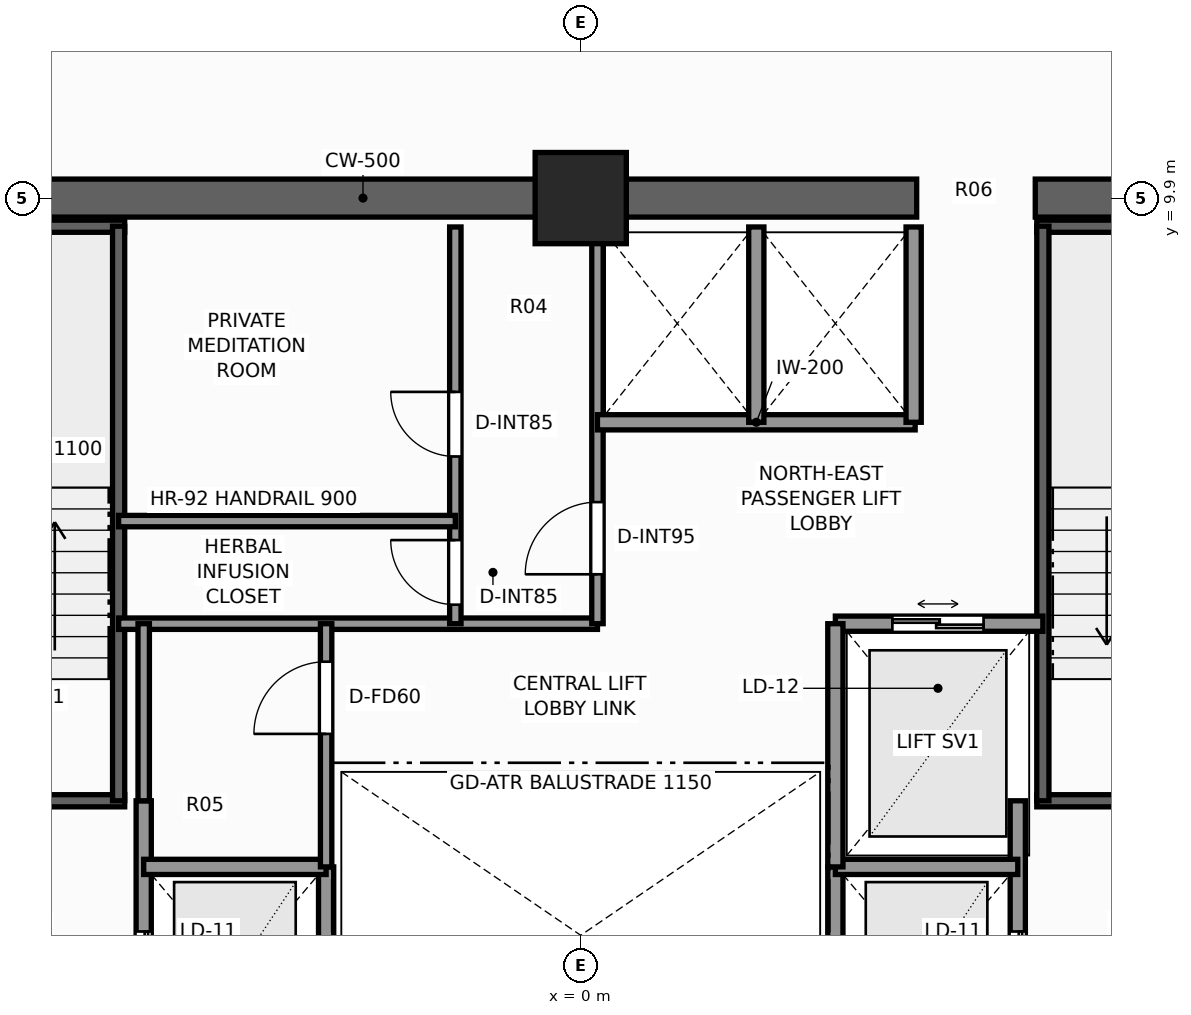
"""IFC4 building model, lengths in metres.
Left out: names, types, materials, properties, quantities, classifications, styles, units other than length and angle.
Written with IfcOpenShell. Run it as: python <this file> out.ifc"""

import sys

from ifc_helpers import new_model, si_unit, direction, frame, frame_2d, origin, origin_2d, place, context, subcontext, project, spatial, rectangle, extrude, element, fill, save


model = new_model("IFC4")
c1 = context("Model", 3, precision=1e-05, world=origin(), true_north=direction((0.0, 1.0)))
c2 = subcontext(c1, "Body", "Model", "MODEL_VIEW")
j1 = project(units=[si_unit("LENGTHUNIT", "METRE"), si_unit("PLANEANGLEUNIT", "RADIAN")], contexts=[c1])
p1 = place(None, origin())
s1 = spatial("IfcSite", under=j1, at=p1, CompositionType="ELEMENT")
p2 = place(p1, origin())
s2 = spatial("IfcBuilding", under=s1, at=p2, CompositionType="ELEMENT")
p3 = place(p2, frame((0.0, 0.0, 183.3)))
s3 = spatial("IfcBuildingStorey", under=s2, at=p3, CompositionType="ELEMENT", Elevation=183.3)
p4 = place(p3, frame((-10.15, 9.9, 0.0), z_axis=(0.0, 0.0, 1.0), x_axis=(1.0, 0.0, 0.0)))
e1 = element("IfcWall", 1, at=p4, inside=s3, PredefinedType="SHEAR", context=c2, shape_type="SweptSolid", body=[
    extrude(rectangle(XDim=14.57, YDim=0.5, at=frame_2d((7.285, 0.0))), origin(), (0.0, 0.0, 1.0), 3.3),
])
p5 = place(p3, frame((5.98, 9.9, 0.0), z_axis=(0.0, 0.0, 1.0), x_axis=(1.0, 0.0, 0.0)))
e2 = element("IfcWall", 2, at=p5, inside=s3, PredefinedType="SHEAR", context=c2, shape_type="SweptSolid", body=[
    extrude(rectangle(XDim=4.17, YDim=0.5, at=frame_2d((2.085, 0.0))), origin(), (0.0, 0.0, 1.0), 3.3),
])
p6 = place(p3, frame((0.0, 9.9, 0.0), z_axis=(0.0, 0.0, 1.0), x_axis=(1.0, 0.0, 0.0)))
e3 = element("IfcColumn", 3, at=p6, inside=s3, PredefinedType="COLUMN", context=c2, shape_type="SweptSolid", body=[
    extrude(rectangle(XDim=1.2, YDim=1.2, at=origin_2d()), origin(), (0.0, 0.0, 1.0), 3.3),
])
p7 = place(p3, frame((-9.52, 1.97, 0.0), z_axis=(0.0, 0.0, 1.0), x_axis=(1.0, 0.0, 0.0)))
e4 = element("IfcWall", 4, at=p7, inside=s3, PredefinedType="SHEAR", context=c2, shape_type="SweptSolid", body=[
    extrude(rectangle(XDim=3.52, YDim=0.16, at=frame_2d((1.76, 0.0))), origin(), (0.0, 0.0, 1.0), 3.3),
])
p8 = place(p7, frame((1.15, 0.0, 0.0)))
e5 = element("IfcOpeningElement", 5, at=p8, cuts=e4, PredefinedType="OPENING", context=c2, shape_type="SweptSolid", body=[
    extrude(rectangle(XDim=1.1, YDim=2.2, at=frame_2d((0.55, 1.1))), frame((0.0, 0.09, 0.0), z_axis=(0.0, -1.0, 0.0), x_axis=(1.0, 0.0, 0.0)), (0.0, 0.0, 1.0), 0.18),
])
p9 = place(p3, frame((-9.52, 9.53, 0.0), z_axis=(0.0, 0.0, 1.0), x_axis=(1.0, 0.0, 0.0)))
e6 = element("IfcWall", 6, at=p9, inside=s3, PredefinedType="SHEAR", context=c2, shape_type="SweptSolid", body=[
    extrude(rectangle(XDim=3.52, YDim=0.16, at=frame_2d((1.76, 0.0))), origin(), (0.0, 0.0, 1.0), 3.3),
])
p10 = place(p3, frame((-6.08, 1.97, 0.0), z_axis=(0.0, 0.0, 1.0), x_axis=(0.0, 1.0, 0.0)))
e7 = element("IfcWall", 7, at=p10, inside=s3, PredefinedType="SHEAR", context=c2, shape_type="SweptSolid", body=[
    extrude(rectangle(XDim=7.56, YDim=0.16, at=frame_2d((3.78, 0.0))), origin(), (0.0, 0.0, 1.0), 3.3),
])
p11 = place(p3, frame((6.0, 1.97, 0.0), z_axis=(0.0, 0.0, 1.0), x_axis=(1.0, 0.0, 0.0)))
e8 = element("IfcWall", 8, at=p11, inside=s3, PredefinedType="SHEAR", context=c2, shape_type="SweptSolid", body=[
    extrude(rectangle(XDim=3.52, YDim=0.16, at=frame_2d((1.76, 0.0))), origin(), (0.0, 0.0, 1.0), 3.3),
])
p12 = place(p11, frame((1.15, 0.0, 0.0)))
e9 = element("IfcOpeningElement", 9, at=p12, cuts=e8, PredefinedType="OPENING", context=c2, shape_type="SweptSolid", body=[
    extrude(rectangle(XDim=1.1, YDim=2.2, at=frame_2d((0.55, 1.1))), frame((0.0, 0.09, 0.0), z_axis=(0.0, -1.0, 0.0), x_axis=(1.0, 0.0, 0.0)), (0.0, 0.0, 1.0), 0.18),
])
p13 = place(p3, frame((6.0, 9.53, 0.0), z_axis=(0.0, 0.0, 1.0), x_axis=(1.0, 0.0, 0.0)))
e10 = element("IfcWall", 10, at=p13, inside=s3, PredefinedType="SHEAR", context=c2, shape_type="SweptSolid", body=[
    extrude(rectangle(XDim=3.52, YDim=0.16, at=frame_2d((1.76, 0.0))), origin(), (0.0, 0.0, 1.0), 3.3),
])
p14 = place(p3, frame((6.08, 1.97, 0.0), z_axis=(0.0, 0.0, 1.0), x_axis=(0.0, 1.0, 0.0)))
e11 = element("IfcWall", 11, at=p14, inside=s3, PredefinedType="SHEAR", context=c2, shape_type="SweptSolid", body=[
    extrude(rectangle(XDim=7.56, YDim=0.16, at=frame_2d((3.78, 0.0))), origin(), (0.0, 0.0, 1.0), 3.3),
])
p15 = place(p3, frame((-5.75, -3.6, 0.0), z_axis=(0.0, 0.0, 1.0), x_axis=(0.0, 1.0, 0.0)))
e12 = element("IfcWall", 12, at=p15, inside=s3, PredefinedType="SOLIDWALL", context=c2, shape_type="SweptSolid", body=[
    extrude(rectangle(XDim=5.57, YDim=0.2, at=frame_2d((2.785, 0.0))), origin(), (0.0, 0.0, 1.0), 2.715),
])
p16 = place(p15, frame((2.75, 0.0, 0.0)))
e13 = element("IfcOpeningElement", 13, at=p16, cuts=e12, PredefinedType="OPENING", context=c2, shape_type="SweptSolid", body=[
    extrude(rectangle(XDim=1.1, YDim=2.2, at=frame_2d((0.55, 1.1))), frame((0.0, 0.11, 0.0), z_axis=(0.0, -1.0, 0.0), x_axis=(1.0, 0.0, 0.0)), (0.0, 0.0, 1.0), 0.22),
])
p17 = place(p3, frame((-3.35, -1.7, 0.0), z_axis=(0.0, 0.0, 1.0), x_axis=(0.0, 1.0, 0.0)))
e14 = element("IfcWall", 14, at=p17, inside=s3, PredefinedType="SOLIDWALL", context=c2, shape_type="SweptSolid", body=[
    extrude(rectangle(XDim=2.8, YDim=0.2, at=frame_2d((1.4, 0.0))), origin(), (0.0, 0.0, 1.0), 2.715),
])
p18 = place(p3, frame((-5.75, 1.1, 0.0), z_axis=(0.0, 0.0, 1.0), x_axis=(1.0, 0.0, 0.0)))
e15 = element("IfcWall", 15, at=p18, inside=s3, PredefinedType="SOLIDWALL", context=c2, shape_type="SweptSolid", body=[
    extrude(rectangle(XDim=2.4, YDim=0.2, at=frame_2d((1.2, 0.0))), origin(), (0.0, 0.0, 1.0), 3.08),
])
p19 = place(p3, frame((5.75, -3.6, 0.0), z_axis=(0.0, 0.0, 1.0), x_axis=(0.0, 1.0, 0.0)))
e16 = element("IfcWall", 16, at=p19, inside=s3, PredefinedType="SOLIDWALL", context=c2, shape_type="SweptSolid", body=[
    extrude(rectangle(XDim=5.57, YDim=0.2, at=frame_2d((2.785, 0.0))), origin(), (0.0, 0.0, 1.0), 2.715),
])
p20 = place(p19, frame((2.75, 0.0, 0.0)))
e17 = element("IfcOpeningElement", 17, at=p20, cuts=e16, PredefinedType="OPENING", context=c2, shape_type="SweptSolid", body=[
    extrude(rectangle(XDim=1.1, YDim=2.2, at=frame_2d((0.55, 1.1))), frame((0.0, 0.11, 0.0), z_axis=(0.0, -1.0, 0.0), x_axis=(1.0, 0.0, 0.0)), (0.0, 0.0, 1.0), 0.22),
])
p21 = place(p3, frame((3.35, -1.7, 0.0), z_axis=(0.0, 0.0, 1.0), x_axis=(0.0, 1.0, 0.0)))
e18 = element("IfcWall", 18, at=p21, inside=s3, PredefinedType="SOLIDWALL", context=c2, shape_type="SweptSolid", body=[
    extrude(rectangle(XDim=2.8, YDim=0.2, at=frame_2d((1.4, 0.0))), origin(), (0.0, 0.0, 1.0), 2.715),
])
p22 = place(p3, frame((3.35, 1.1, 0.0), z_axis=(0.0, 0.0, 1.0), x_axis=(1.0, 0.0, 0.0)))
e19 = element("IfcWall", 19, at=p22, inside=s3, PredefinedType="SOLIDWALL", context=c2, shape_type="SweptSolid", body=[
    extrude(rectangle(XDim=2.4, YDim=0.2, at=frame_2d((1.2, 0.0))), origin(), (0.0, 0.0, 1.0), 3.08),
])
p23 = place(p3, frame((3.35, 4.3, 0.0), z_axis=(0.0, 0.0, 1.0), x_axis=(1.0, 0.0, 0.0)))
e20 = element("IfcWall", 20, at=p23, inside=s3, PredefinedType="SOLIDWALL", context=c2, shape_type="SweptSolid", body=[
    extrude(rectangle(XDim=2.73, YDim=0.2, at=frame_2d((1.365, 0.0))), origin(), (0.0, 0.0, 1.0), 3.08),
])
p24 = place(p23, frame((0.75, 0.0, 0.0)))
e21 = element("IfcOpeningElement", 21, at=p24, cuts=e20, PredefinedType="OPENING", context=c2, shape_type="SweptSolid", body=[
    extrude(rectangle(XDim=1.2, YDim=2.25, at=frame_2d((0.6, 1.125))), frame((0.0, 0.11, 0.0), z_axis=(0.0, -1.0, 0.0), x_axis=(1.0, 0.0, 0.0)), (0.0, 0.0, 1.0), 0.22),
])
p25 = place(p3, frame((3.35, 1.1, 0.0), z_axis=(0.0, 0.0, 1.0), x_axis=(0.0, 1.0, 0.0)))
e22 = element("IfcWall", 22, at=p25, inside=s3, PredefinedType="SOLIDWALL", context=c2, shape_type="SweptSolid", body=[
    extrude(rectangle(XDim=3.2, YDim=0.2, at=frame_2d((1.6, 0.0))), origin(), (0.0, 0.0, 1.0), 2.715),
])
p26 = place(p3, frame((-6.08, 4.3, 0.0), z_axis=(0.0, 0.0, 1.0), x_axis=(1.0, 0.0, 0.0)))
e23 = element("IfcWall", 23, at=p26, inside=s3, PredefinedType="PARTITIONING", context=c2, shape_type="SweptSolid", body=[
    extrude(rectangle(XDim=6.3, YDim=0.15, at=frame_2d((3.15, 0.0))), origin(), (0.0, 0.0, 1.0), 3.08),
])
p27 = place(p3, frame((0.22, 4.3, 0.0), z_axis=(0.0, 0.0, 1.0), x_axis=(0.0, 1.0, 0.0)))
e24 = element("IfcWall", 24, at=p27, inside=s3, PredefinedType="PARTITIONING", context=c2, shape_type="SweptSolid", body=[
    extrude(rectangle(XDim=5.22, YDim=0.15, at=frame_2d((2.61, 0.0))), origin(), (0.0, 0.0, 1.0), 3.08),
])
p28 = place(p27, frame((0.65, 0.0, 0.0)))
e25 = element("IfcOpeningElement", 25, at=p28, cuts=e24, PredefinedType="OPENING", context=c2, shape_type="SweptSolid", body=[
    extrude(rectangle(XDim=0.95, YDim=2.06, at=frame_2d((0.475, 1.03))), frame((0.0, 0.085, 0.0), z_axis=(0.0, -1.0, 0.0), x_axis=(1.0, 0.0, 0.0)), (0.0, 0.0, 1.0), 0.17),
])
p29 = place(p3, frame((-1.65, 4.3, 0.0), z_axis=(0.0, 0.0, 1.0), x_axis=(0.0, 1.0, 0.0)))
e26 = element("IfcWall", 26, at=p29, inside=s3, PredefinedType="PARTITIONING", context=c2, shape_type="SweptSolid", body=[
    extrude(rectangle(XDim=5.22, YDim=0.15, at=frame_2d((2.61, 0.0))), origin(), (0.0, 0.0, 1.0), 3.08),
])
p30 = place(p29, frame((2.2, 0.0, 0.0)))
e27 = element("IfcOpeningElement", 27, at=p30, cuts=e26, PredefinedType="OPENING", context=c2, shape_type="SweptSolid", body=[
    extrude(rectangle(XDim=0.85, YDim=2.03, at=frame_2d((0.425, 1.015))), frame((0.0, 0.085, 0.0), z_axis=(0.0, -1.0, 0.0), x_axis=(1.0, 0.0, 0.0)), (0.0, 0.0, 1.0), 0.17),
])
p31 = place(p29, frame((0.25, 0.0, 0.0)))
e28 = element("IfcOpeningElement", 28, at=p31, cuts=e26, PredefinedType="OPENING", context=c2, shape_type="SweptSolid", body=[
    extrude(rectangle(XDim=0.85, YDim=2.03, at=frame_2d((0.425, 1.015))), frame((0.0, 0.085, 0.0), z_axis=(0.0, -1.0, 0.0), x_axis=(1.0, 0.0, 0.0)), (0.0, 0.0, 1.0), 0.17),
])
p32 = place(p3, frame((-6.08, 5.65, 0.0), z_axis=(0.0, 0.0, 1.0), x_axis=(1.0, 0.0, 0.0)))
e29 = element("IfcWall", 29, at=p32, inside=s3, PredefinedType="PARTITIONING", context=c2, shape_type="SweptSolid", body=[
    extrude(rectangle(XDim=4.43, YDim=0.15, at=frame_2d((2.215, 0.0))), origin(), (0.0, 0.0, 1.0), 3.08),
])
p33 = place(p3, frame((0.22, 6.95, 0.0), z_axis=(0.0, 0.0, 1.0), x_axis=(1.0, 0.0, 0.0)))
e30 = element("IfcWall", 30, at=p33, inside=s3, PredefinedType="SOLIDWALL", context=c2, shape_type="SweptSolid", body=[
    extrude(rectangle(XDim=4.18, YDim=0.2, at=frame_2d((2.09, 0.0))), origin(), (0.0, 0.0, 1.0), 3.08),
])
for number, where, z_axis, x_axis in (
    (31, (4.38, 6.95, 0.0), (0.0, 0.0, 1.0), (0.0, 1.0, 0.0)),
    (32, (2.31, 6.95, 0.0), (0.0, 0.0, 1.0), (0.0, 1.0, 0.0)),
):
    element("IfcWall", number, at=place(p3, frame(where, z_axis=z_axis, x_axis=x_axis)), inside=s3, PredefinedType="SOLIDWALL", context=c2, shape_type="SweptSolid", body=[
        extrude(rectangle(XDim=2.57, YDim=0.2, at=frame_2d((1.285, 0.0))), origin(), (0.0, 0.0, 1.0), 3.08),
    ])
p34 = place(p3, frame((-3.35, 1.1, 0.0), z_axis=(0.0, 0.0, 1.0), x_axis=(0.0, 1.0, 0.0)))
e33 = element("IfcWall", 33, at=p34, inside=s3, PredefinedType="PARTITIONING", context=c2, shape_type="SweptSolid", body=[
    extrude(rectangle(XDim=3.2, YDim=0.15, at=frame_2d((1.6, 0.0))), origin(), (0.0, 0.0, 1.0), 2.715),
])
p35 = place(p34, frame((1.75, 0.0, 0.0)))
e34 = element("IfcOpeningElement", 34, at=p35, cuts=e33, PredefinedType="OPENING", context=c2, shape_type="SweptSolid", body=[
    extrude(rectangle(XDim=0.95, YDim=2.06, at=frame_2d((0.475, 1.03))), frame((0.0, 0.085, 0.0), z_axis=(0.0, -1.0, 0.0), x_axis=(1.0, 0.0, 0.0)), (0.0, 0.0, 1.0), 0.17),
])
p36 = place(p3, frame((-5.75, 1.97, 0.0), z_axis=(0.0, 0.0, 1.0), x_axis=(0.0, 1.0, 0.0)))
e35 = element("IfcWall", 35, at=p36, inside=s3, PredefinedType="PARTITIONING", context=c2, shape_type="SweptSolid", body=[
    extrude(rectangle(XDim=2.33, YDim=0.15, at=frame_2d((1.165, 0.0))), origin(), (0.0, 0.0, 1.0), 2.715),
])
p37 = place(p16, origin())
e36 = element("IfcDoor", 36, at=p37, inside=s3, OperationType="DOUBLE_DOOR_SLIDING", PredefinedType="DOOR", context=c2, shape_type="SweptSolid", body=[
    extrude(rectangle(XDim=1.1, YDim=2.2, at=frame_2d((0.55, 1.1))), frame((0.0, 0.025, 0.0), z_axis=(0.0, -1.0, 0.0), x_axis=(1.0, 0.0, 0.0)), (0.0, 0.0, 1.0), 0.05),
])
fill(e13, e36)
p38 = place(p20, origin())
e37 = element("IfcDoor", 37, at=p38, inside=s3, OperationType="DOUBLE_DOOR_SLIDING", PredefinedType="DOOR", context=c2, shape_type="SweptSolid", body=[
    extrude(rectangle(XDim=1.1, YDim=2.2, at=frame_2d((0.55, 1.1))), frame((0.0, 0.025, 0.0), z_axis=(0.0, -1.0, 0.0), x_axis=(1.0, 0.0, 0.0)), (0.0, 0.0, 1.0), 0.05),
])
fill(e17, e37)
p39 = place(p24, origin())
e38 = element("IfcDoor", 38, at=p39, inside=s3, OperationType="DOUBLE_DOOR_SLIDING", PredefinedType="DOOR", context=c2, shape_type="SweptSolid", body=[
    extrude(rectangle(XDim=1.2, YDim=2.25, at=frame_2d((0.6, 1.125))), frame((0.0, 0.025, 0.0), z_axis=(0.0, -1.0, 0.0), x_axis=(1.0, 0.0, 0.0)), (0.0, 0.0, 1.0), 0.05),
])
fill(e21, e38)
p40 = place(p28, origin())
e39 = element("IfcDoor", 39, at=p40, inside=s3, OperationType="SINGLE_SWING_LEFT", PredefinedType="DOOR", context=c2, shape_type="SweptSolid", body=[
    extrude(rectangle(XDim=0.95, YDim=2.06, at=frame_2d((0.475, 1.03))), frame((0.0, 0.025, 0.0), z_axis=(0.0, -1.0, 0.0), x_axis=(1.0, 0.0, 0.0)), (0.0, 0.0, 1.0), 0.05),
])
fill(e25, e39)
p41 = place(p30, origin())
e40 = element("IfcDoor", 40, at=p41, inside=s3, OperationType="SINGLE_SWING_RIGHT", PredefinedType="DOOR", context=c2, shape_type="SweptSolid", body=[
    extrude(rectangle(XDim=0.85, YDim=2.03, at=frame_2d((0.425, 1.015))), frame((0.0, 0.025, 0.0), z_axis=(0.0, -1.0, 0.0), x_axis=(1.0, 0.0, 0.0)), (0.0, 0.0, 1.0), 0.05),
])
fill(e27, e40)
p42 = place(p31, origin())
e41 = element("IfcDoor", 41, at=p42, inside=s3, OperationType="SINGLE_SWING_RIGHT", PredefinedType="DOOR", context=c2, shape_type="SweptSolid", body=[
    extrude(rectangle(XDim=0.85, YDim=2.03, at=frame_2d((0.425, 1.015))), frame((0.0, 0.025, 0.0), z_axis=(0.0, -1.0, 0.0), x_axis=(1.0, 0.0, 0.0)), (0.0, 0.0, 1.0), 0.05),
])
fill(e28, e41)
p43 = place(p35, origin())
e42 = element("IfcDoor", 42, at=p43, inside=s3, OperationType="SINGLE_SWING_LEFT", PredefinedType="DOOR", context=c2, shape_type="SweptSolid", body=[
    extrude(rectangle(XDim=0.95, YDim=2.06, at=frame_2d((0.475, 1.03))), frame((0.0, 0.025, 0.0), z_axis=(0.0, -1.0, 0.0), x_axis=(1.0, 0.0, 0.0)), (0.0, 0.0, 1.0), 0.05),
])
fill(e34, e42)
save(model, sys.argv[1])
